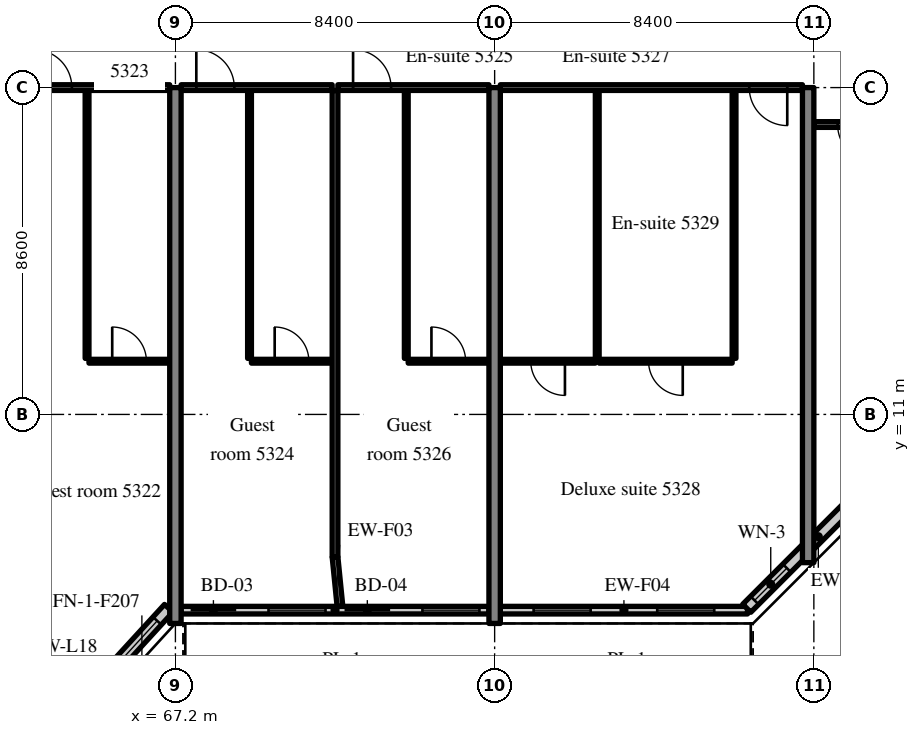
"""IFC4 building model, lengths in metres.
Left out: names, types, materials, properties, quantities, classifications, styles, units other than length and angle.
Written with IfcOpenShell. Run it as: python <this file> out.ifc"""

import sys

from ifc_helpers import new_model, si_unit, direction, frame, frame_2d, origin, place, context, subcontext, project, spatial, rectangle, extrude, source, transform, mapped, element, fill, save


model = new_model("IFC4")
c1 = context("Model", 3, precision=1e-05, world=origin(), true_north=direction((0.0, 1.0)))
c2 = subcontext(c1, "Body", "Model", "MODEL_VIEW")
j1 = project(units=[si_unit("LENGTHUNIT", "METRE"), si_unit("PLANEANGLEUNIT", "RADIAN")], contexts=[c1])
p1 = place(None, origin())
s1 = spatial("IfcSite", under=j1, at=p1, CompositionType="ELEMENT")
p2 = place(p1, origin())
s2 = spatial("IfcBuilding", under=s1, at=p2, CompositionType="ELEMENT")
p3 = place(p2, frame((0.0, 0.0, 221.8)))
s3 = spatial("IfcBuildingStorey", under=s2, at=p3, CompositionType="ELEMENT", Elevation=221.8)
m1 = source(origin(), c2, "Body", "SweptSolid", [
    extrude(rectangle(XDim=14.1, YDim=0.3, at=frame_2d((7.05, 0.0))), origin(), (0.0, 0.0, 1.0), 3.62),
])
for number, where, z_axis, x_axis in (
    (1, (67.2, 5.5, 0.0), (0.0, 0.0, 1.0), (0.0, 1.0, 0.0)),
    (2, (75.6, 5.5, 0.0), (0.0, 0.0, 1.0), (0.0, 1.0, 0.0)),
):
    element("IfcWall", number, at=place(p3, frame(where, z_axis=z_axis, x_axis=x_axis)), inside=s3, PredefinedType="SHEAR", context=c2, shape_type="MappedRepresentation", body=[
        mapped(m1, transform((0.0, 0.0, 0.0), scale=1.0)),
    ])
m2 = source(origin(), c2, "Body", "SweptSolid", [
    extrude(rectangle(XDim=12.5, YDim=0.3, at=frame_2d((6.25, 0.0))), origin(), (0.0, 0.0, 1.0), 3.62),
])
p4 = place(p3, frame((83.85, 7.1, 0.0), z_axis=(0.0, 0.0, 1.0), x_axis=(0.0, 1.0, 0.0)))
e3 = element("IfcWall", 3, at=p4, inside=s3, PredefinedType="SHEAR", context=c2, shape_type="MappedRepresentation", body=[
    mapped(m2, transform((0.0, 0.0, 0.0), scale=1.0)),
])
m3 = source(origin(), c2, "Body", "SweptSolid", [
    extrude(rectangle(XDim=2.398, YDim=0.3, at=frame_2d((1.199, 0.0))), origin(), (0.0, 0.0, 1.0), 3.62),
])
p5 = place(p3, frame((65.404, 4.131, 0.0), z_axis=(0.0, 0.0, 1.0), x_axis=(0.675374189419, 0.737475222815, 0.0)))
e4 = element("IfcWall", 4, at=p5, inside=s3, PredefinedType="SOLIDWALL", context=c2, shape_type="MappedRepresentation", body=[
    mapped(m3, transform((0.0, 0.0, 0.0), scale=1.0)),
])
m4 = source(origin(), c2, "Body", "SweptSolid", [
    extrude(rectangle(XDim=1.5, YDim=2.0, at=frame_2d((0.75, 1.0))), frame((0.0, 0.16, 0.0), z_axis=(0.0, -1.0, 0.0), x_axis=(1.0, 0.0, 0.0)), (0.0, 0.0, 1.0), 0.32),
])
p6 = place(p5, frame((0.449, 0.0, 0.9)))
e5 = element("IfcOpeningElement", 5, at=p6, cuts=e4, PredefinedType="OPENING", context=c2, shape_type="MappedRepresentation", body=[
    mapped(m4, transform((0.0, 0.0, 0.0), scale=1.0)),
])
m5 = source(origin(), c2, "Body", "SweptSolid", [
    extrude(rectangle(XDim=8.1, YDim=0.2, at=frame_2d((4.05, 0.0))), origin(), (0.0, 0.0, 1.0), 3.02),
])
p7 = place(p3, frame((67.35, 5.85, 0.0), z_axis=(0.0, 0.0, 1.0), x_axis=(1.0, 0.0, 0.0)))
e6 = element("IfcWall", 6, at=p7, inside=s3, PredefinedType="SOLIDWALL", context=c2, shape_type="MappedRepresentation", body=[
    mapped(m5, transform((0.0, 0.0, 0.0), scale=1.0)),
])
m6 = source(origin(), c2, "Body", "SweptSolid", [
    extrude(rectangle(XDim=1.2, YDim=2.4, at=frame_2d((0.6, 1.2))), frame((0.0, 0.11, 0.0), z_axis=(0.0, -1.0, 0.0), x_axis=(1.0, 0.0, 0.0)), (0.0, 0.0, 1.0), 0.22),
])
p8 = place(p7, frame((0.25, 0.0, 0.0)))
e7 = element("IfcOpeningElement", 7, at=p8, cuts=e6, PredefinedType="OPENING", context=c2, shape_type="MappedRepresentation", body=[
    mapped(m6, transform((0.0, 0.0, 0.0), scale=1.0)),
])
m7 = source(origin(), c2, "Body", "SweptSolid", [
    extrude(rectangle(XDim=1.5, YDim=1.5, at=frame_2d((0.75, 0.75))), frame((0.0, 0.11, 0.0), z_axis=(0.0, -1.0, 0.0), x_axis=(1.0, 0.0, 0.0)), (0.0, 0.0, 1.0), 0.22),
])
p9 = place(p7, frame((2.3, 0.0, 0.9)))
e8 = element("IfcOpeningElement", 8, at=p9, cuts=e6, PredefinedType="OPENING", context=c2, shape_type="MappedRepresentation", body=[
    mapped(m7, transform((0.0, 0.0, 0.0), scale=1.0)),
])
p10 = place(p7, frame((4.3, 0.0, 0.0)))
e9 = element("IfcOpeningElement", 9, at=p10, cuts=e6, PredefinedType="OPENING", context=c2, shape_type="MappedRepresentation", body=[
    mapped(m6, transform((0.0, 0.0, 0.0), scale=1.0)),
])
p11 = place(p7, frame((6.35, 0.0, 0.9)))
e10 = element("IfcOpeningElement", 10, at=p11, cuts=e6, PredefinedType="OPENING", context=c2, shape_type="MappedRepresentation", body=[
    mapped(m7, transform((0.0, 0.0, 0.0), scale=1.0)),
])
m8 = source(origin(), c2, "Body", "SweptSolid", [
    extrude(rectangle(XDim=6.505, YDim=0.2, at=frame_2d((3.252, 0.0))), origin(), (0.0, 0.0, 1.0), 3.02),
])
p12 = place(p3, frame((75.75, 5.85, 0.0), z_axis=(0.0, 0.0, 1.0), x_axis=(1.0, 0.0, 0.0)))
e11 = element("IfcWall", 11, at=p12, inside=s3, PredefinedType="SOLIDWALL", context=c2, shape_type="MappedRepresentation", body=[
    mapped(m8, transform((0.0, 0.0, 0.0), scale=1.0)),
])
p13 = place(p12, frame((0.876, 0.0, 0.9)))
e12 = element("IfcOpeningElement", 12, at=p13, cuts=e11, PredefinedType="OPENING", context=c2, shape_type="MappedRepresentation", body=[
    mapped(m7, transform((0.0, 0.0, 0.0), scale=1.0)),
])
p14 = place(p12, frame((4.129, 0.0, 0.9)))
e13 = element("IfcOpeningElement", 13, at=p14, cuts=e11, PredefinedType="OPENING", context=c2, shape_type="MappedRepresentation", body=[
    mapped(m7, transform((0.0, 0.0, 0.0), scale=1.0)),
])
m9 = source(origin(), c2, "Body", "SweptSolid", [
    extrude(rectangle(XDim=5.326, YDim=0.3, at=frame_2d((2.663, 0.0))), origin(), (0.0, 0.0, 1.0), 3.62),
])
p15 = place(p3, frame((82.234, 5.9, 0.0), z_axis=(0.0, 0.0, 1.0), x_axis=(0.707083859269, 0.707129702361, 0.0)))
e14 = element("IfcWall", 14, at=p15, inside=s3, PredefinedType="SOLIDWALL", context=c2, shape_type="MappedRepresentation", body=[
    mapped(m9, transform((0.0, 0.0, 0.0), scale=1.0)),
])
m10 = source(origin(), c2, "Body", "SweptSolid", [
    extrude(rectangle(XDim=1.2, YDim=1.5, at=frame_2d((0.6, 0.75))), frame((0.0, 0.16, 0.0), z_axis=(0.0, -1.0, 0.0), x_axis=(1.0, 0.0, 0.0)), (0.0, 0.0, 1.0), 0.32),
])
p16 = place(p15, frame((0.292, 0.0, 0.9)))
e15 = element("IfcOpeningElement", 15, at=p16, cuts=e14, PredefinedType="OPENING", context=c2, shape_type="MappedRepresentation", body=[
    mapped(m10, transform((0.0, 0.0, 0.0), scale=1.0)),
])
m11 = source(origin(), c2, "Body", "SweptSolid", [
    extrude(rectangle(XDim=7.05, YDim=0.1, at=frame_2d((3.525, 0.0))), origin(), (0.0, 0.0, 1.0), 3.62),
])
p17 = place(p3, frame((64.875, 12.475, 0.0), z_axis=(0.0, 0.0, 1.0), x_axis=(0.0, 1.0, 0.0)))
e16 = element("IfcWall", 16, at=p17, inside=s3, PredefinedType="PARTITIONING", context=c2, shape_type="MappedRepresentation", body=[
    mapped(m11, transform((0.0, 0.0, 0.0), scale=1.0)),
])
m12 = source(origin(), c2, "Body", "SweptSolid", [
    extrude(rectangle(XDim=2.125, YDim=0.1, at=frame_2d((1.062, 0.0))), origin(), (0.0, 0.0, 1.0), 3.62),
])
p18 = place(p3, frame((64.925, 12.4, 0.0), z_axis=(0.0, 0.0, 1.0), x_axis=(1.0, 0.0, 0.0)))
e17 = element("IfcWall", 17, at=p18, inside=s3, PredefinedType="PARTITIONING", context=c2, shape_type="MappedRepresentation", body=[
    mapped(m12, transform((0.0, 0.0, 0.0), scale=1.0)),
])
m13 = source(origin(), c2, "Body", "SweptSolid", [
    extrude(rectangle(XDim=0.9, YDim=2.1, at=frame_2d((0.45, 1.05))), frame((0.0, 0.06, 0.0), z_axis=(0.0, -1.0, 0.0), x_axis=(1.0, 0.0, 0.0)), (0.0, 0.0, 1.0), 0.12),
])
p19 = place(p18, frame((0.612, 0.0, 0.0)))
e18 = element("IfcOpeningElement", 18, at=p19, cuts=e17, PredefinedType="OPENING", context=c2, shape_type="MappedRepresentation", body=[
    mapped(m13, transform((0.0, 0.0, 0.0), scale=1.0)),
])
m14 = source(origin(), c2, "Body", "SweptSolid", [
    extrude(rectangle(XDim=3.975, YDim=0.15, at=frame_2d((1.988, 0.0))), origin(), (0.0, 0.0, 1.0), 2.92),
])
p20 = place(p3, frame((63.075, 19.6, 0.0), z_axis=(0.0, 0.0, 1.0), x_axis=(1.0, 0.0, 0.0)))
e19 = element("IfcWall", 19, at=p20, inside=s3, PredefinedType="PARTITIONING", context=c2, shape_type="MappedRepresentation", body=[
    mapped(m14, transform((0.0, 0.0, 0.0), scale=1.0)),
])
m15 = source(origin(), c2, "Body", "SweptSolid", [
    extrude(rectangle(XDim=1.0, YDim=2.1, at=frame_2d((0.5, 1.05))), frame((0.0, 0.085, 0.0), z_axis=(0.0, -1.0, 0.0), x_axis=(1.0, 0.0, 0.0)), (0.0, 0.0, 1.0), 0.17),
])
p21 = place(p20, frame((0.4, 0.0, 0.0)))
e20 = element("IfcOpeningElement", 20, at=p21, cuts=e19, PredefinedType="OPENING", context=c2, shape_type="MappedRepresentation", body=[
    mapped(m15, transform((0.0, 0.0, 0.0), scale=1.0)),
])
p22 = place(p3, frame((69.15, 12.475, 0.0), z_axis=(0.0, 0.0, 1.0), x_axis=(0.0, 1.0, 0.0)))
e21 = element("IfcWall", 21, at=p22, inside=s3, PredefinedType="PARTITIONING", context=c2, shape_type="MappedRepresentation", body=[
    mapped(m11, transform((0.0, 0.0, 0.0), scale=1.0)),
])
p23 = place(p3, frame((69.2, 12.4, 0.0), z_axis=(0.0, 0.0, 1.0), x_axis=(1.0, 0.0, 0.0)))
e22 = element("IfcWall", 22, at=p23, inside=s3, PredefinedType="PARTITIONING", context=c2, shape_type="MappedRepresentation", body=[
    mapped(m12, transform((0.0, 0.0, 0.0), scale=1.0)),
])
p24 = place(p23, frame((0.612, 0.0, 0.0)))
e23 = element("IfcOpeningElement", 23, at=p24, cuts=e22, PredefinedType="OPENING", context=c2, shape_type="MappedRepresentation", body=[
    mapped(m13, transform((0.0, 0.0, 0.0), scale=1.0)),
])
m16 = source(origin(), c2, "Body", "SweptSolid", [
    extrude(rectangle(XDim=3.975, YDim=0.15, at=frame_2d((1.987, 0.0))), origin(), (0.0, 0.0, 1.0), 2.92),
])
p25 = place(p3, frame((67.35, 19.6, 0.0), z_axis=(0.0, 0.0, 1.0), x_axis=(1.0, 0.0, 0.0)))
e24 = element("IfcWall", 24, at=p25, inside=s3, PredefinedType="PARTITIONING", context=c2, shape_type="MappedRepresentation", body=[
    mapped(m16, transform((0.0, 0.0, 0.0), scale=1.0)),
])
p26 = place(p25, frame((0.4, 0.0, 0.0)))
e25 = element("IfcOpeningElement", 25, at=p26, cuts=e24, PredefinedType="OPENING", context=c2, shape_type="MappedRepresentation", body=[
    mapped(m15, transform((0.0, 0.0, 0.0), scale=1.0)),
])
p27 = place(p3, frame((73.275, 12.475, 0.0), z_axis=(0.0, 0.0, 1.0), x_axis=(0.0, 1.0, 0.0)))
e26 = element("IfcWall", 26, at=p27, inside=s3, PredefinedType="PARTITIONING", context=c2, shape_type="MappedRepresentation", body=[
    mapped(m11, transform((0.0, 0.0, 0.0), scale=1.0)),
])
p28 = place(p3, frame((73.325, 12.4, 0.0), z_axis=(0.0, 0.0, 1.0), x_axis=(1.0, 0.0, 0.0)))
e27 = element("IfcWall", 27, at=p28, inside=s3, PredefinedType="PARTITIONING", context=c2, shape_type="MappedRepresentation", body=[
    mapped(m12, transform((0.0, 0.0, 0.0), scale=1.0)),
])
p29 = place(p28, frame((0.612, 0.0, 0.0)))
e28 = element("IfcOpeningElement", 28, at=p29, cuts=e27, PredefinedType="OPENING", context=c2, shape_type="MappedRepresentation", body=[
    mapped(m13, transform((0.0, 0.0, 0.0), scale=1.0)),
])
p30 = place(p3, frame((71.475, 19.6, 0.0), z_axis=(0.0, 0.0, 1.0), x_axis=(1.0, 0.0, 0.0)))
e29 = element("IfcWall", 29, at=p30, inside=s3, PredefinedType="PARTITIONING", context=c2, shape_type="MappedRepresentation", body=[
    mapped(m16, transform((0.0, 0.0, 0.0), scale=1.0)),
])
p31 = place(p30, frame((0.4, 0.0, 0.0)))
e30 = element("IfcOpeningElement", 30, at=p31, cuts=e29, PredefinedType="OPENING", context=c2, shape_type="MappedRepresentation", body=[
    mapped(m15, transform((0.0, 0.0, 0.0), scale=1.0)),
])
m17 = source(origin(), c2, "Body", "SweptSolid", [
    extrude(rectangle(XDim=12.275, YDim=0.15, at=frame_2d((6.137, 0.0))), origin(), (0.0, 0.0, 1.0), 3.62),
])
p32 = place(p3, frame((71.4, 7.25, 0.0), z_axis=(0.0, 0.0, 1.0), x_axis=(0.0, 1.0, 0.0)))
e31 = element("IfcWall", 31, at=p32, inside=s3, PredefinedType="PARTITIONING", context=c2, shape_type="MappedRepresentation", body=[
    mapped(m17, transform((0.0, 0.0, 0.0), scale=1.0)),
])
for number, where, z_axis, x_axis in (
    (32, (81.9, 12.475, 0.0), (0.0, 0.0, 1.0), (0.0, 1.0, 0.0)),
    (33, (78.3, 12.475, 0.0), (0.0, 0.0, 1.0), (0.0, 1.0, 0.0)),
):
    element("IfcWall", number, at=place(p3, frame(where, z_axis=z_axis, x_axis=x_axis)), inside=s3, PredefinedType="PARTITIONING", context=c2, shape_type="MappedRepresentation", body=[
        mapped(m11, transform((0.0, 0.0, 0.0), scale=1.0)),
    ])
m18 = source(origin(), c2, "Body", "SweptSolid", [
    extrude(rectangle(XDim=3.5, YDim=0.1, at=frame_2d((1.75, 0.0))), origin(), (0.0, 0.0, 1.0), 3.62),
])
p33 = place(p3, frame((78.35, 12.4, 0.0), z_axis=(0.0, 0.0, 1.0), x_axis=(1.0, 0.0, 0.0)))
e34 = element("IfcWall", 34, at=p33, inside=s3, PredefinedType="PARTITIONING", context=c2, shape_type="MappedRepresentation", body=[
    mapped(m18, transform((0.0, 0.0, 0.0), scale=1.0)),
])
p34 = place(p33, frame((1.3, 0.0, 0.0)))
e35 = element("IfcOpeningElement", 35, at=p34, cuts=e34, PredefinedType="OPENING", context=c2, shape_type="MappedRepresentation", body=[
    mapped(m13, transform((0.0, 0.0, 0.0), scale=1.0)),
])
m19 = source(origin(), c2, "Body", "SweptSolid", [
    extrude(rectangle(XDim=2.5, YDim=0.1, at=frame_2d((1.25, 0.0))), origin(), (0.0, 0.0, 1.0), 3.62),
])
p35 = place(p3, frame((75.75, 12.4, 0.0), z_axis=(0.0, 0.0, 1.0), x_axis=(1.0, 0.0, 0.0)))
e36 = element("IfcWall", 36, at=p35, inside=s3, PredefinedType="PARTITIONING", context=c2, shape_type="MappedRepresentation", body=[
    mapped(m19, transform((0.0, 0.0, 0.0), scale=1.0)),
])
p36 = place(p35, frame((0.8, 0.0, 0.0)))
e37 = element("IfcOpeningElement", 37, at=p36, cuts=e36, PredefinedType="OPENING", context=c2, shape_type="MappedRepresentation", body=[
    mapped(m13, transform((0.0, 0.0, 0.0), scale=1.0)),
])
m20 = source(origin(), c2, "Body", "SweptSolid", [
    extrude(rectangle(XDim=7.95, YDim=0.15, at=frame_2d((3.975, 0.0))), origin(), (0.0, 0.0, 1.0), 2.92),
])
p37 = place(p3, frame((75.75, 19.6, 0.0), z_axis=(0.0, 0.0, 1.0), x_axis=(1.0, 0.0, 0.0)))
e38 = element("IfcWall", 38, at=p37, inside=s3, PredefinedType="PARTITIONING", context=c2, shape_type="MappedRepresentation", body=[
    mapped(m20, transform((0.0, 0.0, 0.0), scale=1.0)),
])
p38 = place(p37, frame((6.55, 0.0, 0.0)))
e39 = element("IfcOpeningElement", 39, at=p38, cuts=e38, PredefinedType="OPENING", context=c2, shape_type="MappedRepresentation", body=[
    mapped(m15, transform((0.0, 0.0, 0.0), scale=1.0)),
])
m21 = source(origin(), c2, "Body", "SweptSolid", [
    extrude(rectangle(XDim=1.9, YDim=0.15, at=frame_2d((0.95, 0.0))), origin(), (0.0, 0.0, 1.0), 2.92),
])
p39 = place(p3, frame((84.0, 18.628, 0.0), z_axis=(0.0, 0.0, 1.0), x_axis=(1.0, 0.0, 0.0)))
e40 = element("IfcWall", 40, at=p39, inside=s3, PredefinedType="PARTITIONING", context=c2, shape_type="MappedRepresentation", body=[
    mapped(m21, transform((0.0, 0.0, 0.0), scale=1.0)),
])
p40 = place(p39, frame((0.625, 0.0, 0.0)))
e41 = element("IfcOpeningElement", 41, at=p40, cuts=e40, PredefinedType="OPENING", context=c2, shape_type="MappedRepresentation", body=[
    mapped(m15, transform((0.0, 0.0, 0.0), scale=1.0)),
])
m22 = source(origin(), c2, "Body", "SweptSolid", [
    extrude(rectangle(XDim=1.307, YDim=0.15, at=frame_2d((0.653, 0.0))), origin(), (0.0, 0.0, 1.0), 3.62),
])
p41 = place(p3, frame((71.53, 5.95, 0.0), z_axis=(0.0, 0.0, 1.0), x_axis=(-0.099596223396, 0.99502793543, 0.0)))
e42 = element("IfcWall", 42, at=p41, inside=s3, PredefinedType="PARTITIONING", context=c2, shape_type="MappedRepresentation", body=[
    mapped(m22, transform((0.0, 0.0, 0.0), scale=1.0)),
])
m23 = source(origin(), c2, "Body", "SweptSolid", [
    extrude(rectangle(XDim=1.5, YDim=2.0, at=frame_2d((0.75, 1.0))), frame((0.0, 0.03, 0.0), z_axis=(0.0, -1.0, 0.0), x_axis=(1.0, 0.0, 0.0)), (0.0, 0.0, 1.0), 0.06),
])
p42 = place(p6, origin())
e43 = element("IfcWindow", 43, at=p42, inside=s3, PartitioningType="SINGLE_PANEL", PredefinedType="WINDOW", context=c2, shape_type="MappedRepresentation", body=[
    mapped(m23, transform((0.0, 0.0, 0.0), scale=1.0)),
])
fill(e5, e43)
m24 = source(origin(), c2, "Body", "SweptSolid", [
    extrude(rectangle(XDim=1.2, YDim=2.4, at=frame_2d((0.6, 1.2))), frame((0.0, 0.025, 0.0), z_axis=(0.0, -1.0, 0.0), x_axis=(1.0, 0.0, 0.0)), (0.0, 0.0, 1.0), 0.05),
])
p43 = place(p8, origin())
e44 = element("IfcDoor", 44, at=p43, inside=s3, OperationType="SLIDING_TO_LEFT", PredefinedType="DOOR", context=c2, shape_type="MappedRepresentation", body=[
    mapped(m24, transform((0.0, 0.0, 0.0), scale=1.0)),
])
fill(e7, e44)
m25 = source(origin(), c2, "Body", "SweptSolid", [
    extrude(rectangle(XDim=1.5, YDim=1.5, at=frame_2d((0.75, 0.75))), frame((0.0, 0.03, 0.0), z_axis=(0.0, -1.0, 0.0), x_axis=(1.0, 0.0, 0.0)), (0.0, 0.0, 1.0), 0.06),
])
p44 = place(p9, origin())
e45 = element("IfcWindow", 45, at=p44, inside=s3, PartitioningType="SINGLE_PANEL", PredefinedType="WINDOW", context=c2, shape_type="MappedRepresentation", body=[
    mapped(m25, transform((0.0, 0.0, 0.0), scale=1.0)),
])
fill(e8, e45)
p45 = place(p10, origin())
e46 = element("IfcDoor", 46, at=p45, inside=s3, OperationType="SLIDING_TO_RIGHT", PredefinedType="DOOR", context=c2, shape_type="MappedRepresentation", body=[
    mapped(m24, transform((0.0, 0.0, 0.0), scale=1.0)),
])
fill(e9, e46)
p46 = place(p11, origin())
e47 = element("IfcWindow", 47, at=p46, inside=s3, PartitioningType="SINGLE_PANEL", PredefinedType="WINDOW", context=c2, shape_type="MappedRepresentation", body=[
    mapped(m25, transform((0.0, 0.0, 0.0), scale=1.0)),
])
fill(e10, e47)
p47 = place(p13, origin())
e48 = element("IfcWindow", 48, at=p47, inside=s3, PartitioningType="SINGLE_PANEL", PredefinedType="WINDOW", context=c2, shape_type="MappedRepresentation", body=[
    mapped(m25, transform((0.0, 0.0, 0.0), scale=1.0)),
])
fill(e12, e48)
p48 = place(p14, origin())
e49 = element("IfcWindow", 49, at=p48, inside=s3, PartitioningType="SINGLE_PANEL", PredefinedType="WINDOW", context=c2, shape_type="MappedRepresentation", body=[
    mapped(m25, transform((0.0, 0.0, 0.0), scale=1.0)),
])
fill(e13, e49)
m26 = source(origin(), c2, "Body", "SweptSolid", [
    extrude(rectangle(XDim=1.2, YDim=1.5, at=frame_2d((0.6, 0.75))), frame((0.0, 0.03, 0.0), z_axis=(0.0, -1.0, 0.0), x_axis=(1.0, 0.0, 0.0)), (0.0, 0.0, 1.0), 0.06),
])
p49 = place(p16, origin())
e50 = element("IfcWindow", 50, at=p49, inside=s3, PartitioningType="SINGLE_PANEL", PredefinedType="WINDOW", context=c2, shape_type="MappedRepresentation", body=[
    mapped(m26, transform((0.0, 0.0, 0.0), scale=1.0)),
])
fill(e15, e50)
m27 = source(origin(), c2, "Body", "SweptSolid", [
    extrude(rectangle(XDim=0.9, YDim=2.1, at=frame_2d((0.45, 1.05))), frame((0.0, 0.025, 0.0), z_axis=(0.0, -1.0, 0.0), x_axis=(1.0, 0.0, 0.0)), (0.0, 0.0, 1.0), 0.05),
])
p50 = place(p19, origin())
e51 = element("IfcDoor", 51, at=p50, inside=s3, OperationType="SINGLE_SWING_LEFT", PredefinedType="DOOR", context=c2, shape_type="MappedRepresentation", body=[
    mapped(m27, transform((0.0, 0.0, 0.0), scale=1.0)),
])
fill(e18, e51)
m28 = source(origin(), c2, "Body", "SweptSolid", [
    extrude(rectangle(XDim=1.0, YDim=2.1, at=frame_2d((0.5, 1.05))), frame((0.0, 0.025, 0.0), z_axis=(0.0, -1.0, 0.0), x_axis=(1.0, 0.0, 0.0)), (0.0, 0.0, 1.0), 0.05),
])
p51 = place(p21, origin())
e52 = element("IfcDoor", 52, at=p51, inside=s3, OperationType="SINGLE_SWING_LEFT", PredefinedType="DOOR", context=c2, shape_type="MappedRepresentation", body=[
    mapped(m28, transform((0.0, 0.0, 0.0), scale=1.0)),
])
fill(e20, e52)
p52 = place(p24, origin())
e53 = element("IfcDoor", 53, at=p52, inside=s3, OperationType="SINGLE_SWING_LEFT", PredefinedType="DOOR", context=c2, shape_type="MappedRepresentation", body=[
    mapped(m27, transform((0.0, 0.0, 0.0), scale=1.0)),
])
fill(e23, e53)
p53 = place(p26, origin())
e54 = element("IfcDoor", 54, at=p53, inside=s3, OperationType="SINGLE_SWING_LEFT", PredefinedType="DOOR", context=c2, shape_type="MappedRepresentation", body=[
    mapped(m28, transform((0.0, 0.0, 0.0), scale=1.0)),
])
fill(e25, e54)
p54 = place(p29, origin())
e55 = element("IfcDoor", 55, at=p54, inside=s3, OperationType="SINGLE_SWING_LEFT", PredefinedType="DOOR", context=c2, shape_type="MappedRepresentation", body=[
    mapped(m27, transform((0.0, 0.0, 0.0), scale=1.0)),
])
fill(e28, e55)
p55 = place(p31, origin())
e56 = element("IfcDoor", 56, at=p55, inside=s3, OperationType="SINGLE_SWING_LEFT", PredefinedType="DOOR", context=c2, shape_type="MappedRepresentation", body=[
    mapped(m28, transform((0.0, 0.0, 0.0), scale=1.0)),
])
fill(e30, e56)
p56 = place(p34, origin())
e57 = element("IfcDoor", 57, at=p56, inside=s3, OperationType="SINGLE_SWING_RIGHT", PredefinedType="DOOR", context=c2, shape_type="MappedRepresentation", body=[
    mapped(m27, transform((0.0, 0.0, 0.0), scale=1.0)),
])
fill(e35, e57)
p57 = place(p36, origin())
e58 = element("IfcDoor", 58, at=p57, inside=s3, OperationType="SINGLE_SWING_RIGHT", PredefinedType="DOOR", context=c2, shape_type="MappedRepresentation", body=[
    mapped(m27, transform((0.0, 0.0, 0.0), scale=1.0)),
])
fill(e37, e58)
p58 = place(p38, origin())
e59 = element("IfcDoor", 59, at=p58, inside=s3, OperationType="SINGLE_SWING_RIGHT", PredefinedType="DOOR", context=c2, shape_type="MappedRepresentation", body=[
    mapped(m28, transform((0.0, 0.0, 0.0), scale=1.0)),
])
fill(e39, e59)
p59 = place(p40, origin())
e60 = element("IfcDoor", 60, at=p59, inside=s3, OperationType="SINGLE_SWING_RIGHT", PredefinedType="DOOR", context=c2, shape_type="MappedRepresentation", body=[
    mapped(m28, transform((0.0, 0.0, 0.0), scale=1.0)),
])
fill(e41, e60)
save(model, sys.argv[1])
